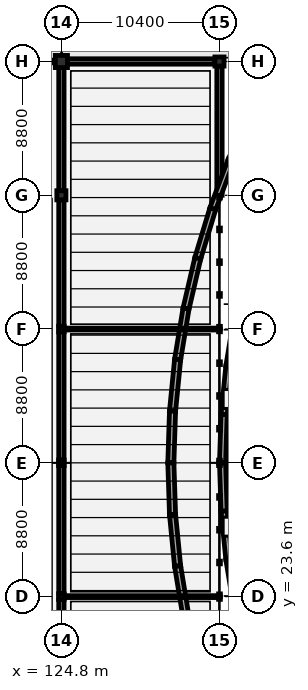
"""IFC4 building model, lengths in metres.
Left out: names, types, materials, properties, quantities, classifications, styles, units other than length and angle.
Written with IfcOpenShell. Run it as: python <this file> out.ifc"""

import sys

from ifc_helpers import new_model, si_unit, direction, frame, frame_2d, origin, origin_2d, place, context, subcontext, project, spatial, rectangle, i_section, extrude, element, fill, save


model = new_model("IFC4")
c1 = context("Model", 3, precision=1e-05, world=origin(), true_north=direction((0.0, 1.0)))
c2 = subcontext(c1, "Body", "Model", "MODEL_VIEW")
j1 = project(units=[si_unit("LENGTHUNIT", "METRE"), si_unit("PLANEANGLEUNIT", "RADIAN")], contexts=[c1])
p1 = place(None, origin())
s1 = spatial("IfcSite", under=j1, at=p1, CompositionType="ELEMENT")
p2 = place(p1, origin())
s2 = spatial("IfcBuilding", under=s1, at=p2, CompositionType="ELEMENT")
p3 = place(p2, origin())
s3 = spatial("IfcBuildingStorey", under=s2, at=p3, CompositionType="ELEMENT", Elevation=0.0)
for number, where, z_axis, x_axis in (
    (1, (124.8, 23.6, 0.0), (0.0, 0.0, 1.0), (1.0, 0.0, 0.0)),
    (2, (124.8, 32.4, 0.0), (0.0, 0.0, 1.0), (1.0, 0.0, 0.0)),
    (3, (124.8, 41.2, 0.0), (0.0, 0.0, 1.0), (1.0, 0.0, 0.0)),
):
    element("IfcColumn", number, at=place(p3, frame(where, z_axis=z_axis, x_axis=x_axis)), inside=s3, PredefinedType="COLUMN", context=c2, shape_type="SweptSolid", body=[
        extrude(i_section(OverallWidth=0.368, OverallDepth=0.368, WebThickness=0.015, FlangeThickness=0.024, FilletRadius=0.025, at=origin_2d()), origin(), (0.0, 0.0, 1.0), 4.8),
    ])
p4 = place(p3, frame((124.8, 50.0, 0.0), z_axis=(0.0, 0.0, 1.0), x_axis=(1.0, 0.0, 0.0)))
e4 = element("IfcColumn", 4, at=p4, inside=s3, PredefinedType="COLUMN", context=c2, shape_type="SweptSolid", body=[
    extrude(rectangle(XDim=0.6, YDim=0.6, at=origin_2d()), origin(), (0.0, 0.0, 1.0), 4.8),
])
p5 = place(p3, frame((124.8, 58.8, 0.0), z_axis=(0.0, 0.0, 1.0), x_axis=(1.0, 0.0, 0.0)))
e5 = element("IfcColumn", 5, at=p5, inside=s3, PredefinedType="COLUMN", context=c2, shape_type="SweptSolid", body=[
    extrude(rectangle(XDim=0.8, YDim=0.8, at=origin_2d()), origin(), (0.0, 0.0, 1.0), 4.8),
])
p6 = place(p3, frame((135.2, 58.8, 0.0), z_axis=(0.0, 0.0, 1.0), x_axis=(1.0, 0.0, 0.0)))
e6 = element("IfcColumn", 6, at=p6, inside=s3, PredefinedType="COLUMN", context=c2, shape_type="SweptSolid", body=[
    extrude(rectangle(XDim=0.6, YDim=0.6, at=origin_2d()), origin(), (0.0, 0.0, 1.0), 4.8),
])
p7 = place(p3, frame((124.8, 15.1, 0.0), z_axis=(0.0, 0.0, 1.0), x_axis=(0.0, 1.0, 0.0)))
e7 = element("IfcWall", 7, at=p7, inside=s3, PredefinedType="SOLIDWALL", context=c2, shape_type="SweptSolid", body=[
    extrude(rectangle(XDim=8.316, YDim=0.35, at=frame_2d((4.158, 0.0))), origin(), (0.0, 0.0, 1.0), 4.1),
])
p8 = place(p7, frame((3.0, 0.0, 0.0)))
e8 = element("IfcOpeningElement", 8, at=p8, cuts=e7, PredefinedType="OPENING", context=c2, shape_type="SweptSolid", body=[
    extrude(rectangle(XDim=1.8, YDim=2.4, at=frame_2d((0.9, 1.2))), frame((0.0, 0.185, 0.0), z_axis=(0.0, -1.0, 0.0), x_axis=(1.0, 0.0, 0.0)), (0.0, 0.0, 1.0), 0.37),
])
p9 = place(p3, frame((124.8, 23.784, 0.0), z_axis=(0.0, 0.0, 1.0), x_axis=(0.0, 1.0, 0.0)))
e9 = element("IfcWall", 9, at=p9, inside=s3, PredefinedType="SOLIDWALL", context=c2, shape_type="SweptSolid", body=[
    extrude(rectangle(XDim=8.432, YDim=0.35, at=frame_2d((4.216, 0.0))), origin(), (0.0, 0.0, 1.0), 4.1),
])
p10 = place(p9, frame((3.0, 0.0, 0.0)))
e10 = element("IfcOpeningElement", 10, at=p10, cuts=e9, PredefinedType="OPENING", context=c2, shape_type="SweptSolid", body=[
    extrude(rectangle(XDim=1.76, YDim=2.37, at=frame_2d((0.88, 1.185))), frame((0.0, 0.185, 0.0), z_axis=(0.0, -1.0, 0.0), x_axis=(1.0, 0.0, 0.0)), (0.0, 0.0, 1.0), 0.37),
])
p11 = place(p3, frame((124.8, 32.584, 0.0), z_axis=(0.0, 0.0, 1.0), x_axis=(0.0, 1.0, 0.0)))
e11 = element("IfcWall", 11, at=p11, inside=s3, PredefinedType="SOLIDWALL", context=c2, shape_type="SweptSolid", body=[
    extrude(rectangle(XDim=8.432, YDim=0.35, at=frame_2d((4.216, 0.0))), origin(), (0.0, 0.0, 1.0), 4.1),
])
p12 = place(p11, frame((3.0, 0.0, 0.0)))
e12 = element("IfcOpeningElement", 12, at=p12, cuts=e11, PredefinedType="OPENING", context=c2, shape_type="SweptSolid", body=[
    extrude(rectangle(XDim=1.72, YDim=2.34, at=frame_2d((0.86, 1.17))), frame((0.0, 0.185, 0.0), z_axis=(0.0, -1.0, 0.0), x_axis=(1.0, 0.0, 0.0)), (0.0, 0.0, 1.0), 0.37),
])
p13 = place(p3, frame((124.8, 41.384, 0.0), z_axis=(0.0, 0.0, 1.0), x_axis=(0.0, 1.0, 0.0)))
e13 = element("IfcWall", 13, at=p13, inside=s3, PredefinedType="SOLIDWALL", context=c2, shape_type="SweptSolid", body=[
    extrude(rectangle(XDim=8.316, YDim=0.35, at=frame_2d((4.158, 0.0))), origin(), (0.0, 0.0, 1.0), 4.1),
])
p14 = place(p13, frame((3.0, 0.0, 0.0)))
e14 = element("IfcOpeningElement", 14, at=p14, cuts=e13, PredefinedType="OPENING", context=c2, shape_type="SweptSolid", body=[
    extrude(rectangle(XDim=1.68, YDim=2.31, at=frame_2d((0.84, 1.155))), frame((0.0, 0.185, 0.0), z_axis=(0.0, -1.0, 0.0), x_axis=(1.0, 0.0, 0.0)), (0.0, 0.0, 1.0), 0.37),
])
p15 = place(p3, frame((124.8, 50.3, 0.0), z_axis=(0.0, 0.0, 1.0), x_axis=(0.0, 1.0, 0.0)))
e15 = element("IfcWall", 15, at=p15, inside=s3, PredefinedType="SOLIDWALL", context=c2, shape_type="SweptSolid", body=[
    extrude(rectangle(XDim=8.1, YDim=0.35, at=frame_2d((4.05, 0.0))), origin(), (0.0, 0.0, 1.0), 4.1),
])
p16 = place(p3, frame((135.2, 50.0, 0.0), z_axis=(0.0, 0.0, 1.0), x_axis=(0.0, 1.0, 0.0)))
e16 = element("IfcWall", 16, at=p16, inside=s3, PredefinedType="SOLIDWALL", context=c2, shape_type="SweptSolid", body=[
    extrude(rectangle(XDim=8.5, YDim=0.35, at=frame_2d((4.25, 0.0))), origin(), (0.0, 0.0, 1.0), 4.1),
])
p17 = place(p16, frame((4.8, 0.0, 0.0)))
e17 = element("IfcOpeningElement", 17, at=p17, cuts=e16, PredefinedType="OPENING", context=c2, shape_type="SweptSolid", body=[
    extrude(rectangle(XDim=1.72, YDim=2.34, at=frame_2d((0.86, 1.17))), frame((0.0, 0.185, 0.0), z_axis=(0.0, -1.0, 0.0), x_axis=(1.0, 0.0, 0.0)), (0.0, 0.0, 1.0), 0.37),
])
p18 = place(p3, frame((125.2, 58.8, 0.0), z_axis=(0.0, 0.0, 1.0), x_axis=(1.0, 0.0, 0.0)))
e18 = element("IfcWall", 18, at=p18, inside=s3, PredefinedType="SOLIDWALL", context=c2, shape_type="SweptSolid", body=[
    extrude(rectangle(XDim=9.7, YDim=0.35, at=frame_2d((4.85, 0.0))), origin(), (0.0, 0.0, 1.0), 4.1),
])
p19 = place(p3, frame((136.334, 41.881, -1.3), z_axis=(0.0, 0.0, 1.0), x_axis=(-0.162929587376, -0.986637699238, 0.0)))
e19 = element("IfcWall", 19, at=p19, inside=s3, PredefinedType="SOLIDWALL", context=c2, shape_type="SweptSolid", body=[
    extrude(rectangle(XDim=3.18, YDim=0.4, at=frame_2d((1.59, 0.0))), origin(), (0.0, 0.0, 1.0), 5.84),
])
p20 = place(p3, frame((135.816, 38.744, -1.3), z_axis=(0.0, 0.0, 1.0), x_axis=(-0.098112632491, -0.995175316889, 0.0)))
e20 = element("IfcWall", 20, at=p20, inside=s3, PredefinedType="SOLIDWALL", context=c2, shape_type="SweptSolid", body=[
    extrude(rectangle(XDim=3.18, YDim=0.4, at=frame_2d((1.59, 0.0))), origin(), (0.0, 0.0, 1.0), 5.84),
])
p21 = place(p3, frame((135.504, 35.579, -1.3), z_axis=(0.0, 0.0, 1.0), x_axis=(-0.03269637773, -0.999465330506, 0.0)))
e21 = element("IfcWall", 21, at=p21, inside=s3, PredefinedType="SOLIDWALL", context=c2, shape_type="SweptSolid", body=[
    extrude(rectangle(XDim=3.181, YDim=0.4, at=frame_2d((1.59, 0.0))), origin(), (0.0, 0.0, 1.0), 5.84),
])
p22 = place(p3, frame((135.4, 32.4, -1.3), z_axis=(0.0, 0.0, 1.0), x_axis=(0.032698886095, -0.999465248444, 0.0)))
e22 = element("IfcWall", 22, at=p22, inside=s3, PredefinedType="SOLIDWALL", context=c2, shape_type="SweptSolid", body=[
    extrude(rectangle(XDim=3.181, YDim=0.4, at=frame_2d((1.59, 0.0))), origin(), (0.0, 0.0, 1.0), 5.84),
])
p23 = place(p3, frame((135.504, 29.221, -1.3), z_axis=(0.0, 0.0, 1.0), x_axis=(0.098105137251, -0.995176055804, 0.0)))
e23 = element("IfcWall", 23, at=p23, inside=s3, PredefinedType="SOLIDWALL", context=c2, shape_type="SweptSolid", body=[
    extrude(rectangle(XDim=3.18, YDim=0.4, at=frame_2d((1.59, 0.0))), origin(), (0.0, 0.0, 1.0), 5.84),
])
p24 = place(p3, frame((135.816, 26.056, -1.3), z_axis=(0.0, 0.0, 1.0), x_axis=(0.162941931057, -0.98663566077, 0.0)))
e24 = element("IfcWall", 24, at=p24, inside=s3, PredefinedType="SOLIDWALL", context=c2, shape_type="SweptSolid", body=[
    extrude(rectangle(XDim=3.179, YDim=0.4, at=frame_2d((1.59, 0.0))), origin(), (0.0, 0.0, 1.0), 5.84),
])
p25 = place(p3, frame((137.363, 55.399, -1.3), z_axis=(0.0, 0.0, 1.0), x_axis=(-0.412937791366, -0.910759232982, 0.0)))
e25 = element("IfcWall", 25, at=p25, inside=s3, PredefinedType="SOLIDWALL", context=c2, shape_type="SweptSolid", body=[
    extrude(rectangle(XDim=3.403, YDim=0.4, at=frame_2d((1.701, 0.0))), origin(), (0.0, 0.0, 1.0), 5.84),
])
p26 = place(p3, frame((135.958, 52.3, -1.3), z_axis=(0.0, 0.0, 1.0), x_axis=(-0.352051035757, -0.935980805478, 0.0)))
e26 = element("IfcWall", 26, at=p26, inside=s3, PredefinedType="SOLIDWALL", context=c2, shape_type="SweptSolid", body=[
    extrude(rectangle(XDim=3.403, YDim=0.4, at=frame_2d((1.701, 0.0))), origin(), (0.0, 0.0, 1.0), 5.84),
])
p27 = place(p3, frame((134.76, 49.115, -1.3), z_axis=(0.0, 0.0, 1.0), x_axis=(-0.290367808858, -0.956915114093, 0.0)))
e27 = element("IfcWall", 27, at=p27, inside=s3, PredefinedType="SOLIDWALL", context=c2, shape_type="SweptSolid", body=[
    extrude(rectangle(XDim=3.403, YDim=0.4, at=frame_2d((1.701, 0.0))), origin(), (0.0, 0.0, 1.0), 5.84),
])
p28 = place(p3, frame((133.772, 45.859, -1.3), z_axis=(0.0, 0.0, 1.0), x_axis=(-0.227143430466, -0.973861315587, 0.0)))
e28 = element("IfcWall", 28, at=p28, inside=s3, PredefinedType="SOLIDWALL", context=c2, shape_type="SweptSolid", body=[
    extrude(rectangle(XDim=3.403, YDim=0.4, at=frame_2d((1.701, 0.0))), origin(), (0.0, 0.0, 1.0), 5.84),
])
p29 = place(p3, frame((132.999, 42.545, -1.3), z_axis=(0.0, 0.0, 1.0), x_axis=(-0.162770150472, -0.986664014807, 0.0)))
e29 = element("IfcWall", 29, at=p29, inside=s3, PredefinedType="SOLIDWALL", context=c2, shape_type="SweptSolid", body=[
    extrude(rectangle(XDim=3.403, YDim=0.4, at=frame_2d((1.702, 0.0))), origin(), (0.0, 0.0, 1.0), 5.84),
])
p30 = place(p3, frame((132.445, 39.187, -1.3), z_axis=(0.0, 0.0, 1.0), x_axis=(-0.098160885719, -0.995170558505, 0.0)))
e30 = element("IfcWall", 30, at=p30, inside=s3, PredefinedType="SOLIDWALL", context=c2, shape_type="SweptSolid", body=[
    extrude(rectangle(XDim=3.402, YDim=0.4, at=frame_2d((1.701, 0.0))), origin(), (0.0, 0.0, 1.0), 5.84),
])
p31 = place(p3, frame((132.111, 35.801, -1.3), z_axis=(0.0, 0.0, 1.0), x_axis=(-0.03264356549, -0.999467056802, 0.0)))
e31 = element("IfcWall", 31, at=p31, inside=s3, PredefinedType="SOLIDWALL", context=c2, shape_type="SweptSolid", body=[
    extrude(rectangle(XDim=3.403, YDim=0.4, at=frame_2d((1.701, 0.0))), origin(), (0.0, 0.0, 1.0), 5.84),
])
p32 = place(p3, frame((132.0, 32.4, -1.3), z_axis=(0.0, 0.0, 1.0), x_axis=(0.032645906393, -0.999466980343, 0.0)))
e32 = element("IfcWall", 32, at=p32, inside=s3, PredefinedType="SOLIDWALL", context=c2, shape_type="SweptSolid", body=[
    extrude(rectangle(XDim=3.403, YDim=0.4, at=frame_2d((1.701, 0.0))), origin(), (0.0, 0.0, 1.0), 5.84),
])
p33 = place(p3, frame((132.111, 28.999, -1.3), z_axis=(0.0, 0.0, 1.0), x_axis=(0.098160885719, -0.995170558505, 0.0)))
e33 = element("IfcWall", 33, at=p33, inside=s3, PredefinedType="SOLIDWALL", context=c2, shape_type="SweptSolid", body=[
    extrude(rectangle(XDim=3.402, YDim=0.4, at=frame_2d((1.701, 0.0))), origin(), (0.0, 0.0, 1.0), 5.84),
])
p34 = place(p3, frame((132.445, 25.613, -1.3), z_axis=(0.0, 0.0, 1.0), x_axis=(0.162758630432, -0.986665915201, 0.0)))
e34 = element("IfcWall", 34, at=p34, inside=s3, PredefinedType="SOLIDWALL", context=c2, shape_type="SweptSolid", body=[
    extrude(rectangle(XDim=3.404, YDim=0.4, at=frame_2d((1.702, 0.0))), origin(), (0.0, 0.0, 1.0), 5.84),
])
for number, where, z_axis, x_axis in (
    (35, (124.75, 23.6, 0.0), (0.0, 0.0, 1.0), (1.0, 0.0, 0.0)),
    (36, (124.75, 41.2, 0.0), (0.0, 0.0, 1.0), (1.0, 0.0, 0.0)),
):
    element("IfcWall", number, at=place(p3, frame(where, z_axis=z_axis, x_axis=x_axis)), inside=s3, PredefinedType="PARTITIONING", context=c2, shape_type="SweptSolid", body=[
        extrude(rectangle(XDim=10.4, YDim=0.125, at=frame_2d((5.2, 0.0))), origin(), (0.0, 0.0, 1.0), 3.835),
    ])
p35 = place(p10, origin())
e37 = element("IfcDoor", 37, at=p35, inside=s3, OperationType="DOUBLE_DOOR_SINGLE_SWING", PredefinedType="DOOR", context=c2, shape_type="SweptSolid", body=[
    extrude(rectangle(XDim=1.76, YDim=2.37, at=frame_2d((0.88, 1.185))), frame((0.0, 0.025, 0.0), z_axis=(0.0, -1.0, 0.0), x_axis=(1.0, 0.0, 0.0)), (0.0, 0.0, 1.0), 0.05),
])
fill(e10, e37)
p36 = place(p12, origin())
e38 = element("IfcDoor", 38, at=p36, inside=s3, OperationType="DOUBLE_DOOR_SINGLE_SWING", PredefinedType="DOOR", context=c2, shape_type="SweptSolid", body=[
    extrude(rectangle(XDim=1.72, YDim=2.34, at=frame_2d((0.86, 1.17))), frame((0.0, 0.025, 0.0), z_axis=(0.0, -1.0, 0.0), x_axis=(1.0, 0.0, 0.0)), (0.0, 0.0, 1.0), 0.05),
])
fill(e12, e38)
p37 = place(p14, origin())
e39 = element("IfcDoor", 39, at=p37, inside=s3, OperationType="DOUBLE_DOOR_SINGLE_SWING", PredefinedType="DOOR", context=c2, shape_type="SweptSolid", body=[
    extrude(rectangle(XDim=1.68, YDim=2.31, at=frame_2d((0.84, 1.155))), frame((0.0, 0.025, 0.0), z_axis=(0.0, -1.0, 0.0), x_axis=(1.0, 0.0, 0.0)), (0.0, 0.0, 1.0), 0.05),
])
fill(e14, e39)
p38 = place(p17, origin())
e40 = element("IfcDoor", 40, at=p38, inside=s3, OperationType="DOUBLE_DOOR_SINGLE_SWING", PredefinedType="DOOR", context=c2, shape_type="SweptSolid", body=[
    extrude(rectangle(XDim=1.72, YDim=2.34, at=frame_2d((0.86, 1.17))), frame((0.0, 0.025, 0.0), z_axis=(0.0, -1.0, 0.0), x_axis=(1.0, 0.0, 0.0)), (0.0, 0.0, 1.0), 0.05),
])
fill(e17, e40)
save(model, sys.argv[1])
